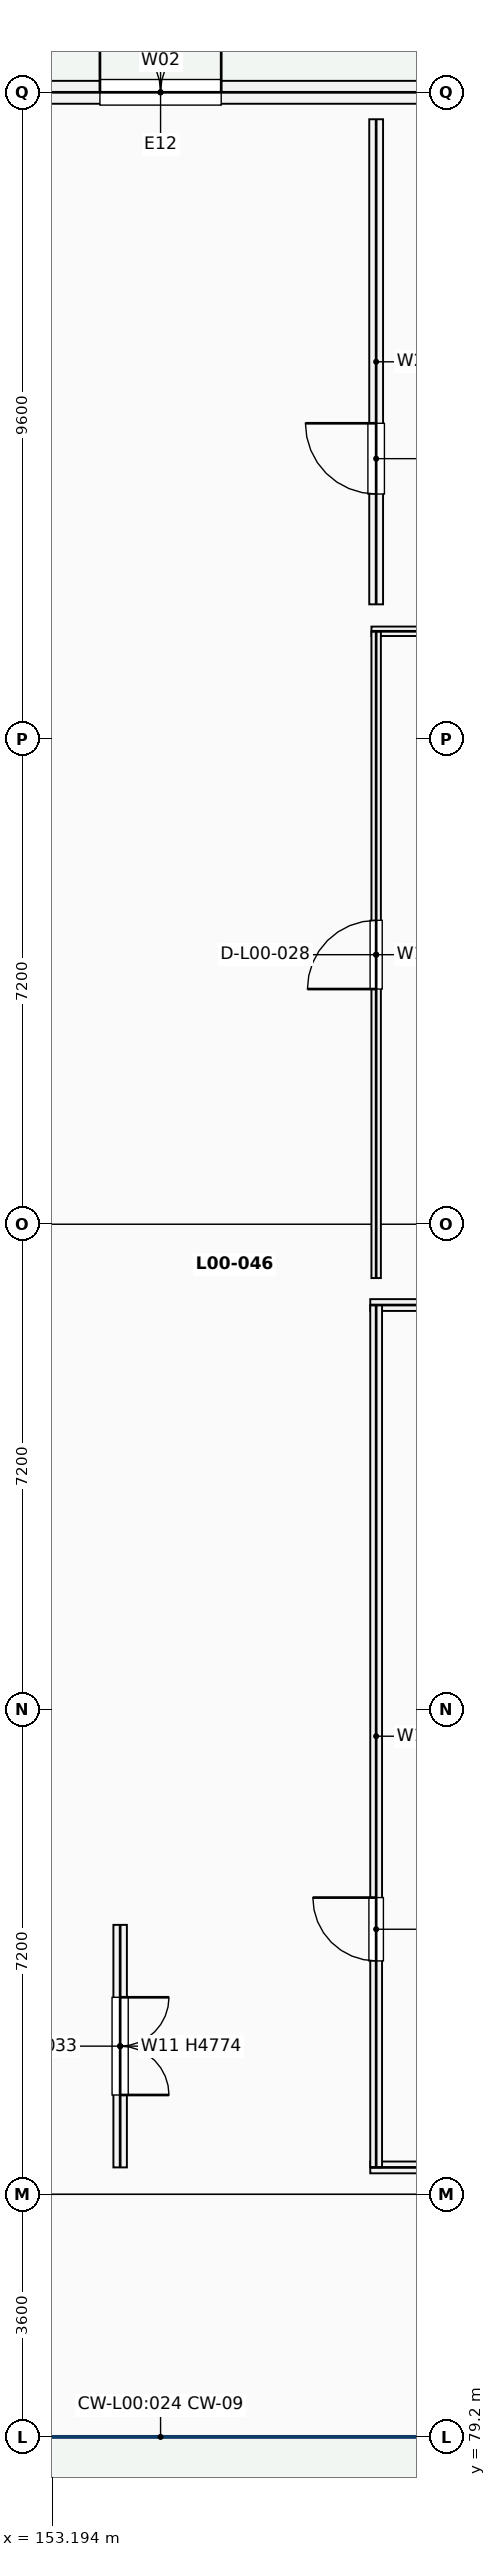
"""IFC4 building model, lengths in metres.
Left out: names, types, materials, properties, quantities, classifications, styles, units other than length and angle.
Written with IfcOpenShell. Run it as: python <this file> out.ifc"""

import sys

from ifc_helpers import new_model, si_unit, direction, frame, frame_2d, origin, place, context, subcontext, project, spatial, rectangle, extrude, element, fill, save


model = new_model("IFC4")
c1 = context("Model", 3, precision=1e-05, world=origin(), true_north=direction((0.0, 1.0)))
c2 = subcontext(c1, "Body", "Model", "MODEL_VIEW")
j1 = project(units=[si_unit("LENGTHUNIT", "METRE"), si_unit("PLANEANGLEUNIT", "RADIAN")], contexts=[c1])
p1 = place(None, origin())
s1 = spatial("IfcSite", under=j1, at=p1, CompositionType="ELEMENT")
p2 = place(p1, origin())
s2 = spatial("IfcBuilding", under=s1, at=p2, CompositionType="ELEMENT")
p3 = place(p2, origin())
s3 = spatial("IfcBuildingStorey", under=s2, at=p3, CompositionType="ELEMENT", Elevation=0.0)
p4 = place(p3, frame((150.227, 114.0, 0.0), z_axis=(0.0, 0.0, 1.0), x_axis=(1.0, 0.0, 0.0)))
e1 = element("IfcWall", 1, at=p4, inside=s3, PredefinedType="SOLIDWALL", context=c2, shape_type="SweptSolid", body=[
    extrude(rectangle(XDim=9.146, YDim=0.34, at=frame_2d((4.573, 0.0))), origin(), (0.0, 0.0, 1.0), 4.284),
])
p5 = place(p4, frame((3.673, 0.0, 0.0)))
e2 = element("IfcOpeningElement", 2, at=p5, cuts=e1, PredefinedType="OPENING", context=c2, shape_type="SweptSolid", body=[
    extrude(rectangle(XDim=1.8, YDim=2.3, at=frame_2d((0.9, 1.15))), frame((0.0, 0.18, 0.0), z_axis=(0.0, -1.0, 0.0), x_axis=(1.0, 0.0, 0.0)), (0.0, 0.0, 1.0), 0.36),
])
p6 = place(p3, frame((154.2, 83.2, 0.0), z_axis=(0.0, 0.0, 1.0), x_axis=(0.0, 1.0, 0.0)))
e3 = element("IfcWall", 3, at=p6, inside=s3, PredefinedType="PARTITIONING", context=c2, shape_type="SweptSolid", body=[
    extrude(rectangle(XDim=3.6, YDim=0.2, at=frame_2d((1.8, 0.0))), origin(), (0.0, 0.0, 1.0), 4.774),
])
p7 = place(p6, frame((1.075, 0.0, 0.0)))
e4 = element("IfcOpeningElement", 4, at=p7, cuts=e3, PredefinedType="OPENING", context=c2, shape_type="SweptSolid", body=[
    extrude(rectangle(XDim=1.45, YDim=2.2, at=frame_2d((0.725, 1.1))), frame((0.0, 0.11, 0.0), z_axis=(0.0, -1.0, 0.0), x_axis=(1.0, 0.0, 0.0)), (0.0, 0.0, 1.0), 0.22),
])
for number, where, z_axis, x_axis in (
    (5, (157.913, 83.2, 0.0), (0.0, 0.0, 1.0), (1.0, 0.0, 0.0)),
    (6, (157.913, 96.0, 0.0), (0.0, 0.0, 1.0), (1.0, 0.0, 0.0)),
):
    element("IfcWall", number, at=place(p3, frame(where, z_axis=z_axis, x_axis=x_axis)), inside=s3, PredefinedType="PARTITIONING", context=c2, shape_type="SweptSolid", body=[
        extrude(rectangle(XDim=7.175, YDim=0.175, at=frame_2d((3.587, 0.0))), origin(), (0.0, 0.0, 1.0), 4.284),
    ])
p8 = place(p3, frame((158.0, 83.2, 0.0), z_axis=(0.0, 0.0, 1.0), x_axis=(0.0, 1.0, 0.0)))
e7 = element("IfcWall", 7, at=p8, inside=s3, PredefinedType="PARTITIONING", context=c2, shape_type="SweptSolid", body=[
    extrude(rectangle(XDim=12.8, YDim=0.175, at=frame_2d((6.4, 0.0))), origin(), (0.0, 0.0, 1.0), 4.034),
])
p9 = place(p8, frame((3.065, 0.0, 0.0)))
e8 = element("IfcOpeningElement", 8, at=p9, cuts=e7, PredefinedType="OPENING", context=c2, shape_type="SweptSolid", body=[
    extrude(rectangle(XDim=0.94, YDim=2.1, at=frame_2d((0.47, 1.05))), frame((0.0, 0.098, 0.0), z_axis=(0.0, -1.0, 0.0), x_axis=(1.0, 0.0, 0.0)), (0.0, 0.0, 1.0), 0.195),
])
p10 = place(p3, frame((157.93, 106.0, 0.0), z_axis=(0.0, 0.0, 1.0), x_axis=(1.0, 0.0, 0.0)))
e9 = element("IfcWall", 9, at=p10, inside=s3, PredefinedType="PARTITIONING", context=c2, shape_type="SweptSolid", body=[
    extrude(rectangle(XDim=7.14, YDim=0.14, at=frame_2d((3.57, 0.0))), origin(), (0.0, 0.0, 1.0), 4.284),
])
p11 = place(p3, frame((158.0, 96.4, 0.0), z_axis=(0.0, 0.0, 1.0), x_axis=(0.0, 1.0, 0.0)))
e10 = element("IfcWall", 10, at=p11, inside=s3, PredefinedType="PARTITIONING", context=c2, shape_type="SweptSolid", body=[
    extrude(rectangle(XDim=9.6, YDim=0.14, at=frame_2d((4.8, 0.0))), origin(), (0.0, 0.0, 1.0), 4.034),
])
p12 = place(p11, frame((4.29, 0.0, 0.0)))
e11 = element("IfcOpeningElement", 11, at=p12, cuts=e10, PredefinedType="OPENING", context=c2, shape_type="SweptSolid", body=[
    extrude(rectangle(XDim=1.02, YDim=2.18, at=frame_2d((0.51, 1.09))), frame((0.0, 0.08, 0.0), z_axis=(0.0, -1.0, 0.0), x_axis=(1.0, 0.0, 0.0)), (0.0, 0.0, 1.0), 0.16),
])
p13 = place(p3, frame((158.0, 106.4, 0.0), z_axis=(0.0, 0.0, 1.0), x_axis=(0.0, 1.0, 0.0)))
e12 = element("IfcWall", 12, at=p13, inside=s3, PredefinedType="PARTITIONING", context=c2, shape_type="SweptSolid", body=[
    extrude(rectangle(XDim=7.2, YDim=0.205, at=frame_2d((3.6, 0.0))), origin(), (0.0, 0.0, 1.0), 4.774),
])
p14 = place(p13, frame((1.637, 0.0, 0.0)))
e13 = element("IfcOpeningElement", 13, at=p14, cuts=e12, PredefinedType="OPENING", context=c2, shape_type="SweptSolid", body=[
    extrude(rectangle(XDim=1.05, YDim=2.15, at=frame_2d((0.525, 1.075))), frame((0.0, 0.113, 0.0), z_axis=(0.0, -1.0, 0.0), x_axis=(1.0, 0.0, 0.0)), (0.0, 0.0, 1.0), 0.225),
])
p15 = place(p5, origin())
e14 = element("IfcDoor", 14, at=p15, inside=s3, OperationType="DOUBLE_DOOR_SINGLE_SWING", PredefinedType="DOOR", context=c2, shape_type="SweptSolid", body=[
    extrude(rectangle(XDim=1.8, YDim=2.3, at=frame_2d((0.9, 1.15))), frame((0.0, 0.025, 0.0), z_axis=(0.0, -1.0, 0.0), x_axis=(1.0, 0.0, 0.0)), (0.0, 0.0, 1.0), 0.05),
])
fill(e2, e14)
p16 = place(p7, frame((1.45, 0.0, 0.0), z_axis=(0.0, 0.0, 1.0), x_axis=(-1.0, 0.0, 0.0)))
e15 = element("IfcDoor", 15, at=p16, inside=s3, OperationType="DOUBLE_DOOR_SINGLE_SWING", PredefinedType="DOOR", context=c2, shape_type="SweptSolid", body=[
    extrude(rectangle(XDim=1.45, YDim=2.2, at=frame_2d((0.725, 1.1))), frame((0.0, 0.025, 0.0), z_axis=(0.0, -1.0, 0.0), x_axis=(1.0, 0.0, 0.0)), (0.0, 0.0, 1.0), 0.05),
])
fill(e4, e15)
p17 = place(p9, origin())
e16 = element("IfcDoor", 16, at=p17, inside=s3, OperationType="SINGLE_SWING_RIGHT", PredefinedType="DOOR", context=c2, shape_type="SweptSolid", body=[
    extrude(rectangle(XDim=0.94, YDim=2.1, at=frame_2d((0.47, 1.05))), frame((0.0, 0.025, 0.0), z_axis=(0.0, -1.0, 0.0), x_axis=(1.0, 0.0, 0.0)), (0.0, 0.0, 1.0), 0.05),
])
fill(e8, e16)
p18 = place(p12, origin())
e17 = element("IfcDoor", 17, at=p18, inside=s3, OperationType="SINGLE_SWING_LEFT", PredefinedType="DOOR", context=c2, shape_type="SweptSolid", body=[
    extrude(rectangle(XDim=1.02, YDim=2.18, at=frame_2d((0.51, 1.09))), frame((0.0, 0.025, 0.0), z_axis=(0.0, -1.0, 0.0), x_axis=(1.0, 0.0, 0.0)), (0.0, 0.0, 1.0), 0.05),
])
fill(e11, e17)
p19 = place(p14, origin())
e18 = element("IfcDoor", 18, at=p19, inside=s3, OperationType="SINGLE_SWING_RIGHT", PredefinedType="DOOR", context=c2, shape_type="SweptSolid", body=[
    extrude(rectangle(XDim=1.05, YDim=2.15, at=frame_2d((0.525, 1.075))), frame((0.0, 0.025, 0.0), z_axis=(0.0, -1.0, 0.0), x_axis=(1.0, 0.0, 0.0)), (0.0, 0.0, 1.0), 0.05),
])
fill(e13, e18)
save(model, sys.argv[1])
